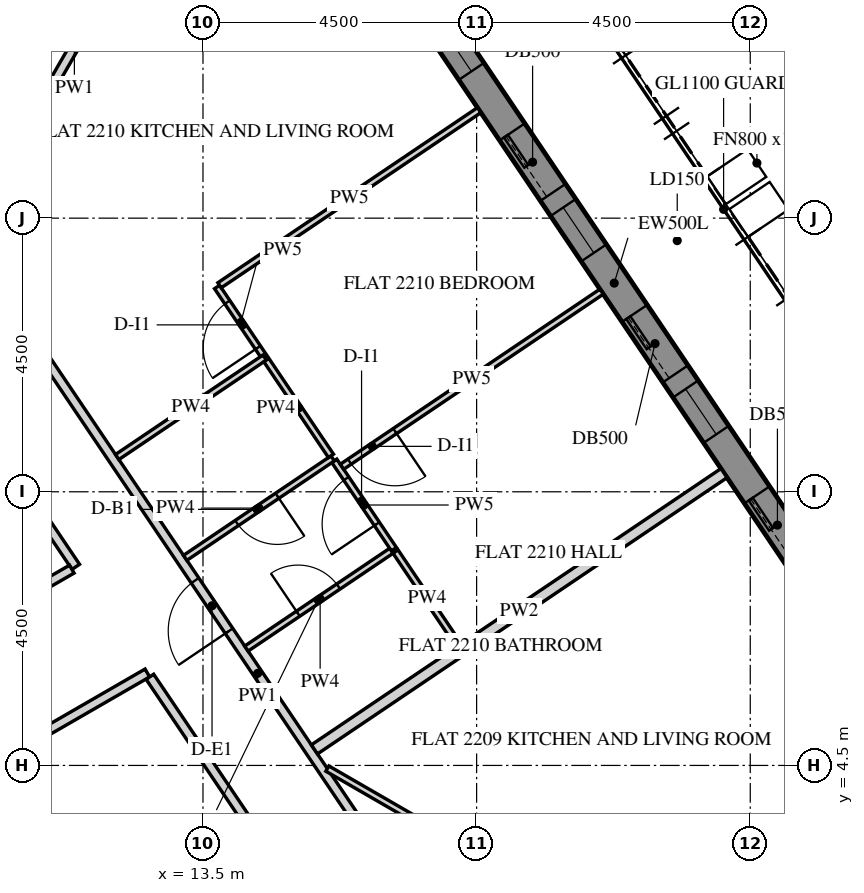
"""IFC4 building model, lengths in metres.
Left out: names, types, materials, properties, quantities, classifications, styles, units other than length and angle.
Written with IfcOpenShell. Run it as: python <this file> out.ifc"""

import sys

from ifc_helpers import new_model, si_unit, direction, frame, frame_2d, origin, place, context, subcontext, project, spatial, polyline, rectangle, outline, extrude, element, fill, save


model = new_model("IFC4")
c1 = context("Model", 3, precision=1e-05, world=origin(), true_north=direction((0.0, 1.0)))
c2 = subcontext(c1, "Body", "Model", "MODEL_VIEW")
j1 = project(units=[si_unit("LENGTHUNIT", "METRE"), si_unit("PLANEANGLEUNIT", "RADIAN")], contexts=[c1])
p1 = place(None, origin())
s1 = spatial("IfcSite", under=j1, at=p1, CompositionType="ELEMENT")
p2 = place(p1, origin())
s2 = spatial("IfcBuilding", under=s1, at=p2, CompositionType="ELEMENT")
p3 = place(p2, frame((0.0, 0.0, 279.6)))
s3 = spatial("IfcBuildingStorey", under=s2, at=p3, CompositionType="ELEMENT", Elevation=279.6)
p4 = place(p3, frame((26.706, 2.879, -0.15), z_axis=(0.0, 0.0, 1.0), x_axis=(-0.559197891507, 0.829034208061, 0.0)))
e1 = element("IfcWall", 1, at=p4, inside=s3, PredefinedType="SOLIDWALL", context=c2, shape_type="SweptSolid", body=[
    extrude(outline(polyline([(0.25, -0.25), (22.795, -0.25), (23.295, 0.25), (-0.25, 0.25), (0.25, -0.25)])), origin(), (0.0, 0.0, 1.0), 3.9),
])
p5 = place(p4, frame((1.323, 0.0, 1.05)))
e2 = element("IfcOpeningElement", 2, at=p5, cuts=e1, PredefinedType="OPENING", context=c2, shape_type="SweptSolid", body=[
    extrude(rectangle(XDim=0.9, YDim=1.5, at=frame_2d((0.45, 0.75))), frame((0.0, 0.26, 0.0), z_axis=(0.0, -1.0, 0.0), x_axis=(1.0, 0.0, 0.0)), (0.0, 0.0, 1.0), 0.52),
])
p6 = place(p4, frame((2.522, 0.0, 0.15)))
e3 = element("IfcOpeningElement", 3, at=p6, cuts=e1, PredefinedType="OPENING", context=c2, shape_type="SweptSolid", body=[
    extrude(rectangle(XDim=1.2, YDim=2.4, at=frame_2d((0.6, 1.2))), frame((0.0, 0.26, 0.0), z_axis=(0.0, -1.0, 0.0), x_axis=(1.0, 0.0, 0.0)), (0.0, 0.0, 1.0), 0.52),
])
p7 = place(p4, frame((4.922, 0.0, 1.05)))
e4 = element("IfcOpeningElement", 4, at=p7, cuts=e1, PredefinedType="OPENING", context=c2, shape_type="SweptSolid", body=[
    extrude(rectangle(XDim=0.9, YDim=1.5, at=frame_2d((0.45, 0.75))), frame((0.0, 0.26, 0.0), z_axis=(0.0, -1.0, 0.0), x_axis=(1.0, 0.0, 0.0)), (0.0, 0.0, 1.0), 0.52),
])
p8 = place(p4, frame((6.122, 0.0, 0.15)))
e5 = element("IfcOpeningElement", 5, at=p8, cuts=e1, PredefinedType="OPENING", context=c2, shape_type="SweptSolid", body=[
    extrude(rectangle(XDim=1.2, YDim=2.4, at=frame_2d((0.6, 1.2))), frame((0.0, 0.26, 0.0), z_axis=(0.0, -1.0, 0.0), x_axis=(1.0, 0.0, 0.0)), (0.0, 0.0, 1.0), 0.52),
])
p9 = place(p4, frame((8.522, 0.0, 1.05)))
e6 = element("IfcOpeningElement", 6, at=p9, cuts=e1, PredefinedType="OPENING", context=c2, shape_type="SweptSolid", body=[
    extrude(rectangle(XDim=0.9, YDim=1.5, at=frame_2d((0.45, 0.75))), frame((0.0, 0.26, 0.0), z_axis=(0.0, -1.0, 0.0), x_axis=(1.0, 0.0, 0.0)), (0.0, 0.0, 1.0), 0.52),
])
p10 = place(p4, frame((9.722, 0.0, 0.15)))
e7 = element("IfcOpeningElement", 7, at=p10, cuts=e1, PredefinedType="OPENING", context=c2, shape_type="SweptSolid", body=[
    extrude(rectangle(XDim=1.2, YDim=2.4, at=frame_2d((0.6, 1.2))), frame((0.0, 0.26, 0.0), z_axis=(0.0, -1.0, 0.0), x_axis=(1.0, 0.0, 0.0)), (0.0, 0.0, 1.0), 0.52),
])
p11 = place(p4, frame((12.122, 0.0, 1.05)))
e8 = element("IfcOpeningElement", 8, at=p11, cuts=e1, PredefinedType="OPENING", context=c2, shape_type="SweptSolid", body=[
    extrude(rectangle(XDim=0.9, YDim=1.5, at=frame_2d((0.45, 0.75))), frame((0.0, 0.26, 0.0), z_axis=(0.0, -1.0, 0.0), x_axis=(1.0, 0.0, 0.0)), (0.0, 0.0, 1.0), 0.52),
])
p12 = place(p4, frame((13.323, 0.0, 0.15)))
e9 = element("IfcOpeningElement", 9, at=p12, cuts=e1, PredefinedType="OPENING", context=c2, shape_type="SweptSolid", body=[
    extrude(rectangle(XDim=1.2, YDim=2.4, at=frame_2d((0.6, 1.2))), frame((0.0, 0.26, 0.0), z_axis=(0.0, -1.0, 0.0), x_axis=(1.0, 0.0, 0.0)), (0.0, 0.0, 1.0), 0.52),
])
p13 = place(p4, frame((15.722, 0.0, 1.05)))
e10 = element("IfcOpeningElement", 10, at=p13, cuts=e1, PredefinedType="OPENING", context=c2, shape_type="SweptSolid", body=[
    extrude(rectangle(XDim=0.9, YDim=1.5, at=frame_2d((0.45, 0.75))), frame((0.0, 0.26, 0.0), z_axis=(0.0, -1.0, 0.0), x_axis=(1.0, 0.0, 0.0)), (0.0, 0.0, 1.0), 0.52),
])
p14 = place(p4, frame((16.922, 0.0, 0.15)))
e11 = element("IfcOpeningElement", 11, at=p14, cuts=e1, PredefinedType="OPENING", context=c2, shape_type="SweptSolid", body=[
    extrude(rectangle(XDim=1.2, YDim=2.4, at=frame_2d((0.6, 1.2))), frame((0.0, 0.26, 0.0), z_axis=(0.0, -1.0, 0.0), x_axis=(1.0, 0.0, 0.0)), (0.0, 0.0, 1.0), 0.52),
])
p15 = place(p4, frame((19.323, 0.0, 1.05)))
e12 = element("IfcOpeningElement", 12, at=p15, cuts=e1, PredefinedType="OPENING", context=c2, shape_type="SweptSolid", body=[
    extrude(rectangle(XDim=0.9, YDim=1.5, at=frame_2d((0.45, 0.75))), frame((0.0, 0.26, 0.0), z_axis=(0.0, -1.0, 0.0), x_axis=(1.0, 0.0, 0.0)), (0.0, 0.0, 1.0), 0.52),
])
p16 = place(p4, frame((20.522, 0.0, 0.15)))
e13 = element("IfcOpeningElement", 13, at=p16, cuts=e1, PredefinedType="OPENING", context=c2, shape_type="SweptSolid", body=[
    extrude(rectangle(XDim=1.2, YDim=2.4, at=frame_2d((0.6, 1.2))), frame((0.0, 0.26, 0.0), z_axis=(0.0, -1.0, 0.0), x_axis=(1.0, 0.0, 0.0)), (0.0, 0.0, 1.0), 0.52),
])
p17 = place(p3, frame((12.471, 0.0, -0.15), z_axis=(0.0, 0.0, 1.0), x_axis=(-0.499996419489, 0.866027470984, 0.0)))
e14 = element("IfcWall", 14, at=p17, inside=s3, PredefinedType="SHEAR", context=c2, shape_type="SweptSolid", body=[
    extrude(outline(polyline([(-0.115, -0.2), (12.586, -0.2), (12.355, 0.2), (0.115, 0.2), (-0.115, -0.2)])), origin(), (0.0, 0.0, 1.0), 3.9),
])
p18 = place(p17, frame((5.306, 0.0, 0.15)))
e15 = element("IfcOpeningElement", 15, at=p18, cuts=e14, PredefinedType="OPENING", context=c2, shape_type="SweptSolid", body=[
    extrude(rectangle(XDim=1.8, YDim=2.4, at=frame_2d((0.9, 1.2))), frame((0.0, 0.21, 0.0), z_axis=(0.0, -1.0, 0.0), x_axis=(1.0, 0.0, 0.0)), (0.0, 0.0, 1.0), 0.42),
])
p19 = place(p3, frame((6.351, 11.0, -0.15), z_axis=(0.0, 0.0, 1.0), x_axis=(0.499998894578, 0.866026041999, 0.0)))
e16 = element("IfcWall", 16, at=p19, inside=s3, PredefinedType="SHEAR", context=c2, shape_type="SweptSolid", body=[
    extrude(rectangle(XDim=15.544, YDim=0.4, at=frame_2d((7.772, 0.0))), origin(), (0.0, 0.0, 1.0), 3.9),
])
p20 = place(p19, frame((6.872, 0.0, 0.15)))
e17 = element("IfcOpeningElement", 17, at=p20, cuts=e16, PredefinedType="OPENING", context=c2, shape_type="SweptSolid", body=[
    extrude(rectangle(XDim=1.8, YDim=2.4, at=frame_2d((0.9, 1.2))), frame((0.0, 0.21, 0.0), z_axis=(0.0, -1.0, 0.0), x_axis=(1.0, 0.0, 0.0)), (0.0, 0.0, 1.0), 0.42),
])
p21 = place(p3, frame((19.228, -1.146, 0.0), z_axis=(0.0, 0.0, 1.0), x_axis=(-0.559173750718, 0.829050490928, 0.0)))
e18 = element("IfcWall", 18, at=p21, inside=s3, PredefinedType="PARTITIONING", context=c2, shape_type="SweptSolid", body=[
    extrude(rectangle(XDim=17.273, YDim=0.15, at=frame_2d((8.637, 0.0))), origin(), (0.0, 0.0, 1.0), 2.988),
])
p22 = place(p21, frame((9.478, 0.0, 0.0)))
e19 = element("IfcOpeningElement", 19, at=p22, cuts=e18, PredefinedType="OPENING", context=c2, shape_type="SweptSolid", body=[
    extrude(rectangle(XDim=1.0, YDim=2.1, at=frame_2d((0.5, 1.05))), frame((0.0, 0.085, 0.0), z_axis=(0.0, -1.0, 0.0), x_axis=(1.0, 0.0, 0.0)), (0.0, 0.0, 1.0), 0.17),
])
p23 = place(p3, frame((9.611, 13.246, 0.0), z_axis=(0.0, 0.0, 1.0), x_axis=(0.499994435258, 0.866028616566, 0.0)))
e20 = element("IfcWall", 20, at=p23, inside=s3, PredefinedType="PARTITIONING", context=c2, shape_type="SweptSolid", body=[
    extrude(rectangle(XDim=7.097, YDim=0.15, at=frame_2d((3.548, 0.0))), origin(), (0.0, 0.0, 1.0), 2.988),
])
p24 = place(p3, frame((10.066, 4.566, 0.0), z_axis=(0.0, 0.0, 1.0), x_axis=(0.866034661658, 0.49998396455, 0.0)))
e21 = element("IfcWall", 21, at=p24, inside=s3, PredefinedType="PARTITIONING", context=c2, shape_type="SweptSolid", body=[
    extrude(rectangle(XDim=2.909, YDim=0.15, at=frame_2d((1.455, 0.0))), origin(), (0.0, 0.0, 1.0), 2.988),
])
p25 = place(p3, frame((12.627, 5.958, 0.0), z_axis=(0.0, 0.0, 1.0), x_axis=(0.559185493191, -0.829042570804, 0.0)))
e22 = element("IfcWall", 22, at=p25, inside=s3, PredefinedType="PARTITIONING", context=c2, shape_type="SweptSolid", body=[
    extrude(rectangle(XDim=8.727, YDim=0.15, at=frame_2d((4.363, 0.0))), origin(), (0.0, 0.0, 1.0), 2.988),
])
p26 = place(p25, frame((3.913, 0.0, 0.0)))
e23 = element("IfcOpeningElement", 23, at=p26, cuts=e22, PredefinedType="OPENING", context=c2, shape_type="SweptSolid", body=[
    extrude(rectangle(XDim=0.9, YDim=2.1, at=frame_2d((0.45, 1.05))), frame((0.0, 0.085, 0.0), z_axis=(0.0, -1.0, 0.0), x_axis=(1.0, 0.0, 0.0)), (0.0, 0.0, 1.0), 0.17),
])
p27 = place(p3, frame((8.028, 12.777, 0.0), z_axis=(0.0, 0.0, 1.0), x_axis=(0.559175239609, -0.829049486707, 0.0)))
e24 = element("IfcWall", 24, at=p27, inside=s3, PredefinedType="PARTITIONING", context=c2, shape_type="SweptSolid", body=[
    extrude(rectangle(XDim=6.045, YDim=0.15, at=frame_2d((3.022, 0.0))), origin(), (0.0, 0.0, 1.0), 2.988),
])
p28 = place(p27, frame((2.572, 0.0, 0.0)))
e25 = element("IfcOpeningElement", 25, at=p28, cuts=e24, PredefinedType="OPENING", context=c2, shape_type="SweptSolid", body=[
    extrude(rectangle(XDim=0.9, YDim=2.1, at=frame_2d((0.45, 1.05))), frame((0.0, 0.085, 0.0), z_axis=(0.0, -1.0, 0.0), x_axis=(1.0, 0.0, 0.0)), (0.0, 0.0, 1.0), 0.17),
])
p29 = place(p3, frame((11.343, 7.728, 0.0), z_axis=(0.0, 0.0, 1.0), x_axis=(-0.866037314867, -0.499979368833, 0.0)))
e26 = element("IfcWall", 26, at=p29, inside=s3, PredefinedType="PARTITIONING", context=c2, shape_type="SweptSolid", body=[
    extrude(rectangle(XDim=2.687, YDim=0.15, at=frame_2d((1.344, 0.0))), origin(), (0.0, 0.0, 1.0), 2.988),
])
p30 = place(p3, frame((15.545, 4.448, 0.0), z_axis=(0.0, 0.0, 1.0), x_axis=(0.866022320763, -0.500005339912, 0.0)))
e27 = element("IfcWall", 27, at=p30, inside=s3, PredefinedType="PARTITIONING", context=c2, shape_type="SweptSolid", body=[
    extrude(rectangle(XDim=9.861, YDim=0.1, at=frame_2d((4.931, 0.0))), origin(), (0.0, 0.0, 1.0), 2.988),
])
p31 = place(p3, frame((22.069, 9.307, 0.0), z_axis=(0.0, 0.0, 1.0), x_axis=(-0.829042649773, -0.559185376111, 0.0)))
e28 = element("IfcWall", 28, at=p31, inside=s3, PredefinedType="PARTITIONING", context=c2, shape_type="SweptSolid", body=[
    extrude(rectangle(XDim=8.125, YDim=0.18, at=frame_2d((4.062, 0.0))), origin(), (0.0, 0.0, 1.0), 2.988),
])
p32 = place(p3, frame((14.515, 11.206, 0.0), z_axis=(0.0, 0.0, 1.0), x_axis=(-0.559272477643, 0.828983893542, 0.0)))
e29 = element("IfcWall", 29, at=p32, inside=s3, PredefinedType="PARTITIONING", context=c2, shape_type="SweptSolid", body=[
    extrude(rectangle(XDim=1.402, YDim=0.1, at=frame_2d((0.701, 0.0))), origin(), (0.0, 0.0, 1.0), 2.988),
])
p33 = place(p32, frame((0.2, 0.0, 0.0)))
e30 = element("IfcOpeningElement", 30, at=p33, cuts=e29, PredefinedType="OPENING", context=c2, shape_type="SweptSolid", body=[
    extrude(rectangle(XDim=0.9, YDim=2.1, at=frame_2d((0.45, 1.05))), frame((0.0, 0.06, 0.0), z_axis=(0.0, -1.0, 0.0), x_axis=(1.0, 0.0, 0.0)), (0.0, 0.0, 1.0), 0.12),
])
p34 = place(p3, frame((13.773, 12.396, 0.0), z_axis=(0.0, 0.0, 1.0), x_axis=(0.82903328576, 0.559199258853, 0.0)))
e31 = element("IfcWall", 31, at=p34, inside=s3, PredefinedType="PARTITIONING", context=c2, shape_type="SweptSolid", body=[
    extrude(rectangle(XDim=5.15, YDim=0.1, at=frame_2d((2.575, 0.0))), origin(), (0.0, 0.0, 1.0), 2.988),
])
p35 = place(p3, frame((12.089, 9.572, 0.0), z_axis=(0.0, 0.0, 1.0), x_axis=(0.829046031219, 0.559180362781, 0.0)))
e32 = element("IfcWall", 32, at=p35, inside=s3, PredefinedType="PARTITIONING", context=c2, shape_type="SweptSolid", body=[
    extrude(rectangle(XDim=2.925, YDim=0.1, at=frame_2d((1.462, 0.0))), origin(), (0.0, 0.0, 1.0), 2.988),
])
p36 = place(p3, frame((14.214, 6.422, 0.0), z_axis=(0.0, 0.0, 1.0), x_axis=(0.829072128826, 0.559141668278, 0.0)))
e33 = element("IfcWall", 33, at=p36, inside=s3, PredefinedType="PARTITIONING", context=c2, shape_type="SweptSolid", body=[
    extrude(rectangle(XDim=2.925, YDim=0.1, at=frame_2d((1.462, 0.0))), origin(), (0.0, 0.0, 1.0), 2.988),
])
p37 = place(p36, frame((1.025, 0.0, 0.0)))
e34 = element("IfcOpeningElement", 34, at=p37, cuts=e33, PredefinedType="OPENING", context=c2, shape_type="SweptSolid", body=[
    extrude(rectangle(XDim=0.8, YDim=2.1, at=frame_2d((0.4, 1.05))), frame((0.0, 0.06, 0.0), z_axis=(0.0, -1.0, 0.0), x_axis=(1.0, 0.0, 0.0)), (0.0, 0.0, 1.0), 0.12),
])
p38 = place(p3, frame((16.64, 8.056, 0.0), z_axis=(0.0, 0.0, 1.0), x_axis=(-0.559157243835, 0.829061624167, 0.0)))
e35 = element("IfcWall", 35, at=p38, inside=s3, PredefinedType="PARTITIONING", context=c2, shape_type="SweptSolid", body=[
    extrude(rectangle(XDim=1.754, YDim=0.1, at=frame_2d((0.877, 0.0))), origin(), (0.0, 0.0, 1.0), 2.988),
])
p39 = place(p38, frame((0.502, 0.0, 0.0)))
e36 = element("IfcOpeningElement", 36, at=p39, cuts=e35, PredefinedType="OPENING", context=c2, shape_type="SweptSolid", body=[
    extrude(rectangle(XDim=0.9, YDim=2.1, at=frame_2d((0.45, 1.05))), frame((0.0, 0.06, 0.0), z_axis=(0.0, -1.0, 0.0), x_axis=(1.0, 0.0, 0.0)), (0.0, 0.0, 1.0), 0.12),
])
p40 = place(p3, frame((15.633, 9.55, 0.0), z_axis=(0.0, 0.0, 1.0), x_axis=(-0.829033436212, -0.559199035802, 0.0)))
e37 = element("IfcWall", 37, at=p40, inside=s3, PredefinedType="PARTITIONING", context=c2, shape_type="SweptSolid", body=[
    extrude(rectangle(XDim=2.925, YDim=0.1, at=frame_2d((1.462, 0.0))), origin(), (0.0, 0.0, 1.0), 2.988),
])
p41 = place(p40, frame((1.1, 0.0, 0.0)))
e38 = element("IfcOpeningElement", 38, at=p41, cuts=e37, PredefinedType="OPENING", context=c2, shape_type="SweptSolid", body=[
    extrude(rectangle(XDim=0.8, YDim=2.1, at=frame_2d((0.4, 1.05))), frame((0.0, 0.06, 0.0), z_axis=(0.0, -1.0, 0.0), x_axis=(1.0, 0.0, 0.0)), (0.0, 0.0, 1.0), 0.12),
])
p42 = place(p3, frame((17.707, 6.474, 0.0), z_axis=(0.0, 0.0, 1.0), x_axis=(-0.559261140113, 0.828991542273, 0.0)))
e39 = element("IfcWall", 39, at=p42, inside=s3, PredefinedType="PARTITIONING", context=c2, shape_type="SweptSolid", body=[
    extrude(rectangle(XDim=1.862, YDim=0.1, at=frame_2d((0.931, 0.0))), origin(), (0.0, 0.0, 1.0), 2.988),
])
p43 = place(p3, frame((20.055, 12.292, 0.0), z_axis=(0.0, 0.0, 1.0), x_axis=(-0.82903328576, -0.559199258853, 0.0)))
e40 = element("IfcWall", 40, at=p43, inside=s3, PredefinedType="PARTITIONING", context=c2, shape_type="SweptSolid", body=[
    extrude(rectangle(XDim=5.15, YDim=0.1, at=frame_2d((2.575, 0.0))), origin(), (0.0, 0.0, 1.0), 2.988),
])
p44 = place(p43, frame((4.1, 0.0, 0.0)))
e41 = element("IfcOpeningElement", 41, at=p44, cuts=e40, PredefinedType="OPENING", context=c2, shape_type="SweptSolid", body=[
    extrude(rectangle(XDim=0.9, YDim=2.1, at=frame_2d((0.45, 1.05))), frame((0.0, 0.06, 0.0), z_axis=(0.0, -1.0, 0.0), x_axis=(1.0, 0.0, 0.0)), (0.0, 0.0, 1.0), 0.12),
])
p45 = place(p3, frame((14.542, 11.166, 0.0), z_axis=(0.0, 0.0, 1.0), x_axis=(0.559170428633, -0.829052731581, 0.0)))
e42 = element("IfcWall", 42, at=p45, inside=s3, PredefinedType="PARTITIONING", context=c2, shape_type="SweptSolid", body=[
    extrude(rectangle(XDim=1.9, YDim=0.1, at=frame_2d((0.95, 0.0))), origin(), (0.0, 0.0, 1.0), 2.988),
])
p46 = place(p8, frame((0.0, 0.175, 0.0)))
e43 = element("IfcDoor", 43, at=p46, inside=s3, OperationType="SLIDING_TO_LEFT", PredefinedType="DOOR", context=c2, shape_type="SweptSolid", body=[
    extrude(rectangle(XDim=1.2, YDim=2.4, at=frame_2d((0.6, 1.2))), frame((0.0, 0.025, 0.0), z_axis=(0.0, -1.0, 0.0), x_axis=(1.0, 0.0, 0.0)), (0.0, 0.0, 1.0), 0.05),
])
fill(e5, e43)
p47 = place(p9, frame((0.0, 0.18, 0.0)))
e44 = element("IfcWindow", 44, at=p47, inside=s3, PartitioningType="SINGLE_PANEL", PredefinedType="WINDOW", context=c2, shape_type="SweptSolid", body=[
    extrude(rectangle(XDim=0.9, YDim=1.5, at=frame_2d((0.45, 0.75))), frame((0.0, 0.03, 0.0), z_axis=(0.0, -1.0, 0.0), x_axis=(1.0, 0.0, 0.0)), (0.0, 0.0, 1.0), 0.06),
])
fill(e6, e44)
p48 = place(p10, frame((0.0, 0.175, 0.0)))
e45 = element("IfcDoor", 45, at=p48, inside=s3, OperationType="SLIDING_TO_LEFT", PredefinedType="DOOR", context=c2, shape_type="SweptSolid", body=[
    extrude(rectangle(XDim=1.2, YDim=2.4, at=frame_2d((0.6, 1.2))), frame((0.0, 0.025, 0.0), z_axis=(0.0, -1.0, 0.0), x_axis=(1.0, 0.0, 0.0)), (0.0, 0.0, 1.0), 0.05),
])
fill(e7, e45)
p49 = place(p11, frame((0.0, 0.18, 0.0)))
e46 = element("IfcWindow", 46, at=p49, inside=s3, PartitioningType="SINGLE_PANEL", PredefinedType="WINDOW", context=c2, shape_type="SweptSolid", body=[
    extrude(rectangle(XDim=0.9, YDim=1.5, at=frame_2d((0.45, 0.75))), frame((0.0, 0.03, 0.0), z_axis=(0.0, -1.0, 0.0), x_axis=(1.0, 0.0, 0.0)), (0.0, 0.0, 1.0), 0.06),
])
fill(e8, e46)
p50 = place(p12, frame((0.0, 0.175, 0.0)))
e47 = element("IfcDoor", 47, at=p50, inside=s3, OperationType="SLIDING_TO_LEFT", PredefinedType="DOOR", context=c2, shape_type="SweptSolid", body=[
    extrude(rectangle(XDim=1.2, YDim=2.4, at=frame_2d((0.6, 1.2))), frame((0.0, 0.025, 0.0), z_axis=(0.0, -1.0, 0.0), x_axis=(1.0, 0.0, 0.0)), (0.0, 0.0, 1.0), 0.05),
])
fill(e9, e47)
p51 = place(p13, frame((0.0, 0.18, 0.0)))
e48 = element("IfcWindow", 48, at=p51, inside=s3, PartitioningType="SINGLE_PANEL", PredefinedType="WINDOW", context=c2, shape_type="SweptSolid", body=[
    extrude(rectangle(XDim=0.9, YDim=1.5, at=frame_2d((0.45, 0.75))), frame((0.0, 0.03, 0.0), z_axis=(0.0, -1.0, 0.0), x_axis=(1.0, 0.0, 0.0)), (0.0, 0.0, 1.0), 0.06),
])
fill(e10, e48)
p52 = place(p22, origin())
e49 = element("IfcDoor", 49, at=p52, inside=s3, OperationType="SINGLE_SWING_LEFT", PredefinedType="DOOR", context=c2, shape_type="SweptSolid", body=[
    extrude(rectangle(XDim=1.0, YDim=2.1, at=frame_2d((0.5, 1.05))), frame((0.0, 0.025, 0.0), z_axis=(0.0, -1.0, 0.0), x_axis=(1.0, 0.0, 0.0)), (0.0, 0.0, 1.0), 0.05),
])
fill(e19, e49)
p53 = place(p37, origin())
e50 = element("IfcDoor", 50, at=p53, inside=s3, OperationType="SINGLE_SWING_RIGHT", PredefinedType="DOOR", context=c2, shape_type="SweptSolid", body=[
    extrude(rectangle(XDim=0.8, YDim=2.1, at=frame_2d((0.4, 1.05))), frame((0.0, 0.025, 0.0), z_axis=(0.0, -1.0, 0.0), x_axis=(1.0, 0.0, 0.0)), (0.0, 0.0, 1.0), 0.05),
])
fill(e34, e50)
p54 = place(p39, origin())
e51 = element("IfcDoor", 51, at=p54, inside=s3, OperationType="SINGLE_SWING_RIGHT", PredefinedType="DOOR", context=c2, shape_type="SweptSolid", body=[
    extrude(rectangle(XDim=0.9, YDim=2.1, at=frame_2d((0.45, 1.05))), frame((0.0, 0.025, 0.0), z_axis=(0.0, -1.0, 0.0), x_axis=(1.0, 0.0, 0.0)), (0.0, 0.0, 1.0), 0.05),
])
fill(e36, e51)
p55 = place(p44, origin())
e52 = element("IfcDoor", 52, at=p55, inside=s3, OperationType="SINGLE_SWING_RIGHT", PredefinedType="DOOR", context=c2, shape_type="SweptSolid", body=[
    extrude(rectangle(XDim=0.9, YDim=2.1, at=frame_2d((0.45, 1.05))), frame((0.0, 0.025, 0.0), z_axis=(0.0, -1.0, 0.0), x_axis=(1.0, 0.0, 0.0)), (0.0, 0.0, 1.0), 0.05),
])
fill(e41, e52)
p56 = place(p33, origin())
e53 = element("IfcDoor", 53, at=p56, inside=s3, OperationType="SINGLE_SWING_RIGHT", PredefinedType="DOOR", context=c2, shape_type="SweptSolid", body=[
    extrude(rectangle(XDim=0.9, YDim=2.1, at=frame_2d((0.45, 1.05))), frame((0.0, 0.025, 0.0), z_axis=(0.0, -1.0, 0.0), x_axis=(1.0, 0.0, 0.0)), (0.0, 0.0, 1.0), 0.05),
])
fill(e30, e53)
p57 = place(p41, origin())
e54 = element("IfcDoor", 54, at=p57, inside=s3, OperationType="SINGLE_SWING_LEFT", PredefinedType="DOOR", context=c2, shape_type="SweptSolid", body=[
    extrude(rectangle(XDim=0.8, YDim=2.1, at=frame_2d((0.4, 1.05))), frame((0.0, 0.025, 0.0), z_axis=(0.0, -1.0, 0.0), x_axis=(1.0, 0.0, 0.0)), (0.0, 0.0, 1.0), 0.05),
])
fill(e38, e54)
save(model, sys.argv[1])
